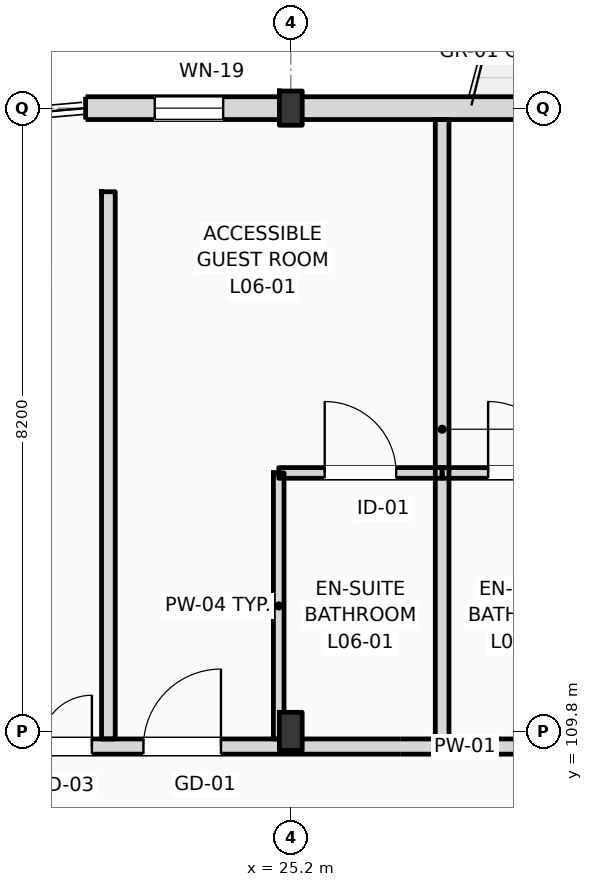
"""IFC4 building model, lengths in metres.
Left out: names, types, materials, properties, quantities, classifications, styles, units other than length and angle.
Written with IfcOpenShell. Run it as: python <this file> out.ifc"""

import sys

from ifc_helpers import new_model, si_unit, direction, frame, frame_2d, origin, origin_2d, place, context, subcontext, project, spatial, rectangle, i_section, extrude, element, fill, save


model = new_model("IFC4")
c1 = context("Model", 3, precision=1e-05, world=origin(), true_north=direction((0.0, 1.0)))
c2 = subcontext(c1, "Body", "Model", "MODEL_VIEW")
j1 = project(units=[si_unit("LENGTHUNIT", "METRE"), si_unit("PLANEANGLEUNIT", "RADIAN")], contexts=[c1])
p1 = place(None, origin())
s1 = spatial("IfcSite", under=j1, at=p1, CompositionType="ELEMENT")
p2 = place(p1, origin())
s2 = spatial("IfcBuilding", under=s1, at=p2, CompositionType="ELEMENT")
p3 = place(p2, frame((0.0, 0.0, 28.2)))
s3 = spatial("IfcBuildingStorey", under=s2, at=p3, CompositionType="ELEMENT", Elevation=28.2)
p4 = place(p3, frame((25.2, 109.8, 0.0), z_axis=(0.0, 0.0, 1.0), x_axis=(1.0, 0.0, 0.0)))
e1 = element("IfcColumn", 1, at=p4, inside=s3, PredefinedType="COLUMN", context=c2, shape_type="SweptSolid", body=[
    extrude(i_section(OverallWidth=0.3, OverallDepth=0.5, WebThickness=0.014, FlangeThickness=0.028, FilletRadius=0.027, at=origin_2d()), origin(), (0.0, 0.0, 1.0), 3.6),
])
p5 = place(p3, frame((25.2, 118.0, 0.0), z_axis=(0.0, 0.0, 1.0), x_axis=(1.0, 0.0, 0.0)))
e2 = element("IfcColumn", 2, at=p5, inside=s3, PredefinedType="COLUMN", context=c2, shape_type="SweptSolid", body=[
    extrude(i_section(OverallWidth=0.3, OverallDepth=0.45, WebThickness=0.014, FlangeThickness=0.026, FilletRadius=0.027, at=origin_2d()), origin(), (0.0, 0.0, 1.0), 3.6),
])
p6 = place(p3, frame((22.5, 118.0, 0.0), z_axis=(0.0, 0.0, 1.0), x_axis=(1.0, 0.0, 0.0)))
e3 = element("IfcWall", 3, at=p6, inside=s3, PredefinedType="STANDARD", context=c2, shape_type="SweptSolid", body=[
    extrude(rectangle(XDim=97.5, YDim=0.3, at=frame_2d((48.75, 0.0))), origin(), (0.0, 0.0, 1.0), 2.8),
])
p7 = place(p6, frame((0.91, 0.0, 0.9)))
e4 = element("IfcOpeningElement", 4, at=p7, cuts=e3, PredefinedType="OPENING", context=c2, shape_type="SweptSolid", body=[
    extrude(rectangle(XDim=0.9, YDim=1.72, at=frame_2d((0.45, 0.86))), frame((0.0, 0.16, 0.0), z_axis=(0.0, -1.0, 0.0), x_axis=(1.0, 0.0, 0.0)), (0.0, 0.0, 1.0), 0.32),
])
p8 = place(p6, frame((6.561, 0.0, 0.0)))
e5 = element("IfcOpeningElement", 5, at=p8, cuts=e3, PredefinedType="OPENING", context=c2, shape_type="SweptSolid", body=[
    extrude(rectangle(XDim=1.2, YDim=2.25, at=frame_2d((0.6, 1.125))), frame((0.0, 0.16, 0.0), z_axis=(0.0, -1.0, 0.0), x_axis=(1.0, 0.0, 0.0)), (0.0, 0.0, 1.0), 0.32),
])
p9 = place(p6, frame((11.477, 0.0, 0.9)))
e6 = element("IfcOpeningElement", 6, at=p9, cuts=e3, PredefinedType="OPENING", context=c2, shape_type="SweptSolid", body=[
    extrude(rectangle(XDim=1.1, YDim=1.5, at=frame_2d((0.55, 0.75))), frame((0.0, 0.16, 0.0), z_axis=(0.0, -1.0, 0.0), x_axis=(1.0, 0.0, 0.0)), (0.0, 0.0, 1.0), 0.32),
])
p10 = place(p6, frame((15.194, 0.0, 0.9)))
e7 = element("IfcOpeningElement", 7, at=p10, cuts=e3, PredefinedType="OPENING", context=c2, shape_type="SweptSolid", body=[
    extrude(rectangle(XDim=1.25, YDim=1.6, at=frame_2d((0.625, 0.8))), frame((0.0, 0.16, 0.0), z_axis=(0.0, -1.0, 0.0), x_axis=(1.0, 0.0, 0.0)), (0.0, 0.0, 1.0), 0.32),
])
p11 = place(p6, frame((19.509, 0.0, 0.9)))
e8 = element("IfcOpeningElement", 8, at=p11, cuts=e3, PredefinedType="OPENING", context=c2, shape_type="SweptSolid", body=[
    extrude(rectangle(XDim=1.4, YDim=1.7, at=frame_2d((0.7, 0.85))), frame((0.0, 0.16, 0.0), z_axis=(0.0, -1.0, 0.0), x_axis=(1.0, 0.0, 0.0)), (0.0, 0.0, 1.0), 0.32),
])
p12 = place(p6, frame((23.258, 0.0, 0.0)))
e9 = element("IfcOpeningElement", 9, at=p12, cuts=e3, PredefinedType="OPENING", context=c2, shape_type="SweptSolid", body=[
    extrude(rectangle(XDim=1.2, YDim=2.25, at=frame_2d((0.6, 1.125))), frame((0.0, 0.16, 0.0), z_axis=(0.0, -1.0, 0.0), x_axis=(1.0, 0.0, 0.0)), (0.0, 0.0, 1.0), 0.32),
])
p13 = place(p6, frame((28.115, 0.0, 0.9)))
e10 = element("IfcOpeningElement", 10, at=p13, cuts=e3, PredefinedType="OPENING", context=c2, shape_type="SweptSolid", body=[
    extrude(rectangle(XDim=1.75, YDim=1.72, at=frame_2d((0.875, 0.86))), frame((0.0, 0.16, 0.0), z_axis=(0.0, -1.0, 0.0), x_axis=(1.0, 0.0, 0.0)), (0.0, 0.0, 1.0), 0.32),
])
p14 = place(p6, frame((31.582, 0.0, 0.9)))
e11 = element("IfcOpeningElement", 11, at=p14, cuts=e3, PredefinedType="OPENING", context=c2, shape_type="SweptSolid", body=[
    extrude(rectangle(XDim=1.35, YDim=1.72, at=frame_2d((0.675, 0.86))), frame((0.0, 0.16, 0.0), z_axis=(0.0, -1.0, 0.0), x_axis=(1.0, 0.0, 0.0)), (0.0, 0.0, 1.0), 0.32),
])
p15 = place(p6, frame((37.379, 0.0, 0.0)))
e12 = element("IfcOpeningElement", 12, at=p15, cuts=e3, PredefinedType="OPENING", context=c2, shape_type="SweptSolid", body=[
    extrude(rectangle(XDim=1.2, YDim=2.25, at=frame_2d((0.6, 1.125))), frame((0.0, 0.16, 0.0), z_axis=(0.0, -1.0, 0.0), x_axis=(1.0, 0.0, 0.0)), (0.0, 0.0, 1.0), 0.32),
])
p16 = place(p6, frame((42.663, 0.0, 0.9)))
e13 = element("IfcOpeningElement", 13, at=p16, cuts=e3, PredefinedType="OPENING", context=c2, shape_type="SweptSolid", body=[
    extrude(rectangle(XDim=1.35, YDim=1.72, at=frame_2d((0.675, 0.86))), frame((0.0, 0.16, 0.0), z_axis=(0.0, -1.0, 0.0), x_axis=(1.0, 0.0, 0.0)), (0.0, 0.0, 1.0), 0.32),
])
p17 = place(p6, frame((45.119, 0.0, 0.9)))
e14 = element("IfcOpeningElement", 14, at=p17, cuts=e3, PredefinedType="OPENING", context=c2, shape_type="SweptSolid", body=[
    extrude(rectangle(XDim=2.871, YDim=1.72, at=frame_2d((1.436, 0.86))), frame((0.0, 0.16, 0.0), z_axis=(0.0, -1.0, 0.0), x_axis=(1.0, 0.0, 0.0)), (0.0, 0.0, 1.0), 0.32),
])
p18 = place(p6, frame((50.41, 0.0, 0.9)))
e15 = element("IfcOpeningElement", 15, at=p18, cuts=e3, PredefinedType="OPENING", context=c2, shape_type="SweptSolid", body=[
    extrude(rectangle(XDim=1.8, YDim=1.72, at=frame_2d((0.9, 0.86))), frame((0.0, 0.16, 0.0), z_axis=(0.0, -1.0, 0.0), x_axis=(1.0, 0.0, 0.0)), (0.0, 0.0, 1.0), 0.32),
])
p19 = place(p6, frame((54.375, 0.0, 0.0)))
e16 = element("IfcOpeningElement", 16, at=p19, cuts=e3, PredefinedType="OPENING", context=c2, shape_type="SweptSolid", body=[
    extrude(rectangle(XDim=1.2, YDim=2.25, at=frame_2d((0.6, 1.125))), frame((0.0, 0.16, 0.0), z_axis=(0.0, -1.0, 0.0), x_axis=(1.0, 0.0, 0.0)), (0.0, 0.0, 1.0), 0.32),
])
p20 = place(p6, frame((59.052, 0.0, 0.9)))
e17 = element("IfcOpeningElement", 17, at=p20, cuts=e3, PredefinedType="OPENING", context=c2, shape_type="SweptSolid", body=[
    extrude(rectangle(XDim=1.35, YDim=1.72, at=frame_2d((0.675, 0.86))), frame((0.0, 0.16, 0.0), z_axis=(0.0, -1.0, 0.0), x_axis=(1.0, 0.0, 0.0)), (0.0, 0.0, 1.0), 0.32),
])
p21 = place(p6, frame((62.768, 0.0, 0.9)))
e18 = element("IfcOpeningElement", 18, at=p21, cuts=e3, PredefinedType="OPENING", context=c2, shape_type="SweptSolid", body=[
    extrude(rectangle(XDim=1.5, YDim=1.72, at=frame_2d((0.75, 0.86))), frame((0.0, 0.16, 0.0), z_axis=(0.0, -1.0, 0.0), x_axis=(1.0, 0.0, 0.0)), (0.0, 0.0, 1.0), 0.32),
])
p22 = place(p6, frame((68.498, 0.0, 0.0)))
e19 = element("IfcOpeningElement", 19, at=p22, cuts=e3, PredefinedType="OPENING", context=c2, shape_type="SweptSolid", body=[
    extrude(rectangle(XDim=1.2, YDim=2.25, at=frame_2d((0.6, 1.125))), frame((0.0, 0.16, 0.0), z_axis=(0.0, -1.0, 0.0), x_axis=(1.0, 0.0, 0.0)), (0.0, 0.0, 1.0), 0.32),
])
p23 = place(p6, frame((71.265, 0.0, 0.9)))
e20 = element("IfcOpeningElement", 20, at=p23, cuts=e3, PredefinedType="OPENING", context=c2, shape_type="SweptSolid", body=[
    extrude(rectangle(XDim=0.9, YDim=1.72, at=frame_2d((0.45, 0.86))), frame((0.0, 0.16, 0.0), z_axis=(0.0, -1.0, 0.0), x_axis=(1.0, 0.0, 0.0)), (0.0, 0.0, 1.0), 0.32),
])
p24 = place(p6, frame((76.316, 0.0, 0.9)))
e21 = element("IfcOpeningElement", 21, at=p24, cuts=e3, PredefinedType="OPENING", context=c2, shape_type="SweptSolid", body=[
    extrude(rectangle(XDim=1.95, YDim=1.72, at=frame_2d((0.975, 0.86))), frame((0.0, 0.16, 0.0), z_axis=(0.0, -1.0, 0.0), x_axis=(1.0, 0.0, 0.0)), (0.0, 0.0, 1.0), 0.32),
])
p25 = place(p6, frame((81.632, 0.0, 0.9)))
e22 = element("IfcOpeningElement", 22, at=p25, cuts=e3, PredefinedType="OPENING", context=c2, shape_type="SweptSolid", body=[
    extrude(rectangle(XDim=1.35, YDim=1.72, at=frame_2d((0.675, 0.86))), frame((0.0, 0.16, 0.0), z_axis=(0.0, -1.0, 0.0), x_axis=(1.0, 0.0, 0.0)), (0.0, 0.0, 1.0), 0.32),
])
p26 = place(p6, frame((84.948, 0.0, 0.9)))
e23 = element("IfcOpeningElement", 23, at=p26, cuts=e3, PredefinedType="OPENING", context=c2, shape_type="SweptSolid", body=[
    extrude(rectangle(XDim=2.25, YDim=1.72, at=frame_2d((1.125, 0.86))), frame((0.0, 0.16, 0.0), z_axis=(0.0, -1.0, 0.0), x_axis=(1.0, 0.0, 0.0)), (0.0, 0.0, 1.0), 0.32),
])
p27 = place(p6, frame((90.063, 0.0, 0.9)))
e24 = element("IfcOpeningElement", 24, at=p27, cuts=e3, PredefinedType="OPENING", context=c2, shape_type="SweptSolid", body=[
    extrude(rectangle(XDim=1.8, YDim=1.72, at=frame_2d((0.9, 0.86))), frame((0.0, 0.16, 0.0), z_axis=(0.0, -1.0, 0.0), x_axis=(1.0, 0.0, 0.0)), (0.0, 0.0, 1.0), 0.32),
])
p28 = place(p6, frame((93.529, 0.0, 0.9)))
e25 = element("IfcOpeningElement", 25, at=p28, cuts=e3, PredefinedType="OPENING", context=c2, shape_type="SweptSolid", body=[
    extrude(rectangle(XDim=2.55, YDim=1.72, at=frame_2d((1.275, 0.86))), frame((0.0, 0.16, 0.0), z_axis=(0.0, -1.0, 0.0), x_axis=(1.0, 0.0, 0.0)), (0.0, 0.0, 1.0), 0.32),
])
p29 = place(p3, frame((10.65, 109.6, 0.0), z_axis=(0.0, 0.0, 1.0), x_axis=(1.0, 0.0, 0.0)))
e26 = element("IfcWall", 26, at=p29, inside=s3, PredefinedType="PARTITIONING", context=c2, shape_type="SweptSolid", body=[
    extrude(rectangle(XDim=109.21, YDim=0.2, at=frame_2d((54.605, 0.0))), origin(), (0.0, 0.0, 1.0), 2.8),
])
p30 = place(p29, frame((12.611, 0.0, 0.0)))
e27 = element("IfcOpeningElement", 27, at=p30, cuts=e26, PredefinedType="OPENING", context=c2, shape_type="SweptSolid", body=[
    extrude(rectangle(XDim=1.02, YDim=2.2, at=frame_2d((0.51, 1.1))), frame((0.0, 0.11, 0.0), z_axis=(0.0, -1.0, 0.0), x_axis=(1.0, 0.0, 0.0)), (0.0, 0.0, 1.0), 0.22),
])
p31 = place(p29, frame((19.451, 0.0, 0.0)))
e28 = element("IfcOpeningElement", 28, at=p31, cuts=e26, PredefinedType="OPENING", context=c2, shape_type="SweptSolid", body=[
    extrude(rectangle(XDim=1.02, YDim=2.2, at=frame_2d((0.51, 1.1))), frame((0.0, 0.11, 0.0), z_axis=(0.0, -1.0, 0.0), x_axis=(1.0, 0.0, 0.0)), (0.0, 0.0, 1.0), 0.22),
])
p32 = place(p29, frame((23.842, 0.0, 0.0)))
e29 = element("IfcOpeningElement", 29, at=p32, cuts=e26, PredefinedType="OPENING", context=c2, shape_type="SweptSolid", body=[
    extrude(rectangle(XDim=1.02, YDim=2.2, at=frame_2d((0.51, 1.1))), frame((0.0, 0.11, 0.0), z_axis=(0.0, -1.0, 0.0), x_axis=(1.0, 0.0, 0.0)), (0.0, 0.0, 1.0), 0.22),
])
p33 = place(p29, frame((26.084, 0.0, 0.0)))
e30 = element("IfcOpeningElement", 30, at=p33, cuts=e26, PredefinedType="OPENING", context=c2, shape_type="SweptSolid", body=[
    extrude(rectangle(XDim=1.02, YDim=2.2, at=frame_2d((0.51, 1.1))), frame((0.0, 0.11, 0.0), z_axis=(0.0, -1.0, 0.0), x_axis=(1.0, 0.0, 0.0)), (0.0, 0.0, 1.0), 0.22),
])
p34 = place(p29, frame((32.655, 0.0, 0.0)))
e31 = element("IfcOpeningElement", 31, at=p34, cuts=e26, PredefinedType="OPENING", context=c2, shape_type="SweptSolid", body=[
    extrude(rectangle(XDim=0.96, YDim=2.2, at=frame_2d((0.48, 1.1))), frame((0.0, 0.11, 0.0), z_axis=(0.0, -1.0, 0.0), x_axis=(1.0, 0.0, 0.0)), (0.0, 0.0, 1.0), 0.22),
])
p35 = place(p29, frame((34.895, 0.0, 0.0)))
e32 = element("IfcOpeningElement", 32, at=p35, cuts=e26, PredefinedType="OPENING", context=c2, shape_type="SweptSolid", body=[
    extrude(rectangle(XDim=0.96, YDim=2.2, at=frame_2d((0.48, 1.1))), frame((0.0, 0.11, 0.0), z_axis=(0.0, -1.0, 0.0), x_axis=(1.0, 0.0, 0.0)), (0.0, 0.0, 1.0), 0.22),
])
p36 = place(p29, frame((41.436, 0.0, 0.0)))
e33 = element("IfcOpeningElement", 33, at=p36, cuts=e26, PredefinedType="OPENING", context=c2, shape_type="SweptSolid", body=[
    extrude(rectangle(XDim=0.96, YDim=2.2, at=frame_2d((0.48, 1.1))), frame((0.0, 0.11, 0.0), z_axis=(0.0, -1.0, 0.0), x_axis=(1.0, 0.0, 0.0)), (0.0, 0.0, 1.0), 0.22),
])
p37 = place(p29, frame((43.427, 0.0, 0.0)))
e34 = element("IfcOpeningElement", 34, at=p37, cuts=e26, PredefinedType="OPENING", context=c2, shape_type="SweptSolid", body=[
    extrude(rectangle(XDim=0.96, YDim=2.2, at=frame_2d((0.48, 1.1))), frame((0.0, 0.11, 0.0), z_axis=(0.0, -1.0, 0.0), x_axis=(1.0, 0.0, 0.0)), (0.0, 0.0, 1.0), 0.22),
])
p38 = place(p29, frame((50.218, 0.0, 0.0)))
e35 = element("IfcOpeningElement", 35, at=p38, cuts=e26, PredefinedType="OPENING", context=c2, shape_type="SweptSolid", body=[
    extrude(rectangle(XDim=0.96, YDim=2.2, at=frame_2d((0.48, 1.1))), frame((0.0, 0.11, 0.0), z_axis=(0.0, -1.0, 0.0), x_axis=(1.0, 0.0, 0.0)), (0.0, 0.0, 1.0), 0.22),
])
p39 = place(p29, frame((54.859, 0.0, 0.0)))
e36 = element("IfcOpeningElement", 36, at=p39, cuts=e26, PredefinedType="OPENING", context=c2, shape_type="SweptSolid", body=[
    extrude(rectangle(XDim=0.96, YDim=2.2, at=frame_2d((0.48, 1.1))), frame((0.0, 0.11, 0.0), z_axis=(0.0, -1.0, 0.0), x_axis=(1.0, 0.0, 0.0)), (0.0, 0.0, 1.0), 0.22),
])
p40 = place(p29, frame((59.0, 0.0, 0.0)))
e37 = element("IfcOpeningElement", 37, at=p40, cuts=e26, PredefinedType="OPENING", context=c2, shape_type="SweptSolid", body=[
    extrude(rectangle(XDim=0.96, YDim=2.2, at=frame_2d((0.48, 1.1))), frame((0.0, 0.11, 0.0), z_axis=(0.0, -1.0, 0.0), x_axis=(1.0, 0.0, 0.0)), (0.0, 0.0, 1.0), 0.22),
])
p41 = place(p29, frame((63.39, 0.0, 0.0)))
e38 = element("IfcOpeningElement", 38, at=p41, cuts=e26, PredefinedType="OPENING", context=c2, shape_type="SweptSolid", body=[
    extrude(rectangle(XDim=0.96, YDim=2.2, at=frame_2d((0.48, 1.1))), frame((0.0, 0.11, 0.0), z_axis=(0.0, -1.0, 0.0), x_axis=(1.0, 0.0, 0.0)), (0.0, 0.0, 1.0), 0.22),
])
p42 = place(p29, frame((65.631, 0.0, 0.0)))
e39 = element("IfcOpeningElement", 39, at=p42, cuts=e26, PredefinedType="OPENING", context=c2, shape_type="SweptSolid", body=[
    extrude(rectangle(XDim=0.96, YDim=2.2, at=frame_2d((0.48, 1.1))), frame((0.0, 0.11, 0.0), z_axis=(0.0, -1.0, 0.0), x_axis=(1.0, 0.0, 0.0)), (0.0, 0.0, 1.0), 0.22),
])
p43 = place(p29, frame((72.172, 0.0, 0.0)))
e40 = element("IfcOpeningElement", 40, at=p43, cuts=e26, PredefinedType="OPENING", context=c2, shape_type="SweptSolid", body=[
    extrude(rectangle(XDim=0.96, YDim=2.2, at=frame_2d((0.48, 1.1))), frame((0.0, 0.11, 0.0), z_axis=(0.0, -1.0, 0.0), x_axis=(1.0, 0.0, 0.0)), (0.0, 0.0, 1.0), 0.22),
])
p44 = place(p29, frame((74.413, 0.0, 0.0)))
e41 = element("IfcOpeningElement", 41, at=p44, cuts=e26, PredefinedType="OPENING", context=c2, shape_type="SweptSolid", body=[
    extrude(rectangle(XDim=0.96, YDim=2.2, at=frame_2d((0.48, 1.1))), frame((0.0, 0.11, 0.0), z_axis=(0.0, -1.0, 0.0), x_axis=(1.0, 0.0, 0.0)), (0.0, 0.0, 1.0), 0.22),
])
p45 = place(p29, frame((80.954, 0.0, 0.0)))
e42 = element("IfcOpeningElement", 42, at=p45, cuts=e26, PredefinedType="OPENING", context=c2, shape_type="SweptSolid", body=[
    extrude(rectangle(XDim=0.96, YDim=2.2, at=frame_2d((0.48, 1.1))), frame((0.0, 0.11, 0.0), z_axis=(0.0, -1.0, 0.0), x_axis=(1.0, 0.0, 0.0)), (0.0, 0.0, 1.0), 0.22),
])
p46 = place(p29, frame((83.195, 0.0, 0.0)))
e43 = element("IfcOpeningElement", 43, at=p46, cuts=e26, PredefinedType="OPENING", context=c2, shape_type="SweptSolid", body=[
    extrude(rectangle(XDim=0.96, YDim=2.2, at=frame_2d((0.48, 1.1))), frame((0.0, 0.11, 0.0), z_axis=(0.0, -1.0, 0.0), x_axis=(1.0, 0.0, 0.0)), (0.0, 0.0, 1.0), 0.22),
])
p47 = place(p29, frame((89.735, 0.0, 0.0)))
e44 = element("IfcOpeningElement", 44, at=p47, cuts=e26, PredefinedType="OPENING", context=c2, shape_type="SweptSolid", body=[
    extrude(rectangle(XDim=0.96, YDim=2.2, at=frame_2d((0.48, 1.1))), frame((0.0, 0.11, 0.0), z_axis=(0.0, -1.0, 0.0), x_axis=(1.0, 0.0, 0.0)), (0.0, 0.0, 1.0), 0.22),
])
p48 = place(p29, frame((94.126, 0.0, 0.0)))
e45 = element("IfcOpeningElement", 45, at=p48, cuts=e26, PredefinedType="OPENING", context=c2, shape_type="SweptSolid", body=[
    extrude(rectangle(XDim=0.96, YDim=2.2, at=frame_2d((0.48, 1.1))), frame((0.0, 0.11, 0.0), z_axis=(0.0, -1.0, 0.0), x_axis=(1.0, 0.0, 0.0)), (0.0, 0.0, 1.0), 0.22),
])
p49 = place(p29, frame((98.517, 0.0, 0.0)))
e46 = element("IfcOpeningElement", 46, at=p49, cuts=e26, PredefinedType="OPENING", context=c2, shape_type="SweptSolid", body=[
    extrude(rectangle(XDim=0.96, YDim=2.2, at=frame_2d((0.48, 1.1))), frame((0.0, 0.11, 0.0), z_axis=(0.0, -1.0, 0.0), x_axis=(1.0, 0.0, 0.0)), (0.0, 0.0, 1.0), 0.22),
])
p50 = place(p29, frame((102.908, 0.0, 0.0)))
e47 = element("IfcOpeningElement", 47, at=p50, cuts=e26, PredefinedType="OPENING", context=c2, shape_type="SweptSolid", body=[
    extrude(rectangle(XDim=0.96, YDim=2.2, at=frame_2d((0.48, 1.1))), frame((0.0, 0.11, 0.0), z_axis=(0.0, -1.0, 0.0), x_axis=(1.0, 0.0, 0.0)), (0.0, 0.0, 1.0), 0.22),
])
p51 = place(p29, frame((105.099, 0.0, 0.0)))
e48 = element("IfcOpeningElement", 48, at=p51, cuts=e26, PredefinedType="OPENING", context=c2, shape_type="SweptSolid", body=[
    extrude(rectangle(XDim=0.96, YDim=2.2, at=frame_2d((0.48, 1.1))), frame((0.0, 0.11, 0.0), z_axis=(0.0, -1.0, 0.0), x_axis=(1.0, 0.0, 0.0)), (0.0, 0.0, 1.0), 0.22),
])
p52 = place(p29, frame((2.716, 0.0, 0.0)))
e49 = element("IfcOpeningElement", 49, at=p52, cuts=e26, PredefinedType="OPENING", context=c2, shape_type="SweptSolid", body=[
    extrude(rectangle(XDim=1.35, YDim=2.25, at=frame_2d((0.675, 1.125))), frame((0.0, 0.11, 0.0), z_axis=(0.0, -1.0, 0.0), x_axis=(1.0, 0.0, 0.0)), (0.0, 0.0, 1.0), 0.22),
])
p53 = place(p29, frame((6.65, 0.0, 0.0)))
e50 = element("IfcOpeningElement", 50, at=p53, cuts=e26, PredefinedType="OPENING", context=c2, shape_type="SweptSolid", body=[
    extrude(rectangle(XDim=1.35, YDim=2.25, at=frame_2d((0.675, 1.125))), frame((0.0, 0.11, 0.0), z_axis=(0.0, -1.0, 0.0), x_axis=(1.0, 0.0, 0.0)), (0.0, 0.0, 1.0), 0.22),
])
p54 = place(p29, frame((10.583, 0.0, 0.0)))
e51 = element("IfcOpeningElement", 51, at=p54, cuts=e26, PredefinedType="OPENING", context=c2, shape_type="SweptSolid", body=[
    extrude(rectangle(XDim=1.35, YDim=2.25, at=frame_2d((0.675, 1.125))), frame((0.0, 0.11, 0.0), z_axis=(0.0, -1.0, 0.0), x_axis=(1.0, 0.0, 0.0)), (0.0, 0.0, 1.0), 0.22),
])
p55 = place(p3, frame((27.191, 109.7, 0.0), z_axis=(0.0, 0.0, 1.0), x_axis=(0.0, 1.0, 0.0)))
e52 = element("IfcWall", 52, at=p55, inside=s3, PredefinedType="PARTITIONING", context=c2, shape_type="SweptSolid", body=[
    extrude(rectangle(XDim=8.15, YDim=0.18, at=frame_2d((4.075, 0.0))), origin(), (0.0, 0.0, 1.0), 3.36),
])
p56 = place(p3, frame((25.041, 109.7, 0.0), z_axis=(0.0, 0.0, 1.0), x_axis=(0.0, 1.0, 0.0)))
e53 = element("IfcWall", 53, at=p56, inside=s3, PredefinedType="PARTITIONING", context=c2, shape_type="SweptSolid", body=[
    extrude(rectangle(XDim=3.5, YDim=0.14, at=frame_2d((1.75, 0.0))), origin(), (0.0, 0.0, 1.0), 2.99),
])
p57 = place(p3, frame((25.041, 113.2, 0.0), z_axis=(0.0, 0.0, 1.0), x_axis=(1.0, 0.0, 0.0)))
e54 = element("IfcWall", 54, at=p57, inside=s3, PredefinedType="PARTITIONING", context=c2, shape_type="SweptSolid", body=[
    extrude(rectangle(XDim=2.15, YDim=0.14, at=frame_2d((1.075, 0.0))), origin(), (0.0, 0.0, 1.0), 3.36),
])
p58 = place(p57, frame((0.605, 0.0, 0.0)))
e55 = element("IfcOpeningElement", 55, at=p58, cuts=e54, PredefinedType="OPENING", context=c2, shape_type="SweptSolid", body=[
    extrude(rectangle(XDim=0.94, YDim=2.15, at=frame_2d((0.47, 1.075))), frame((0.0, 0.08, 0.0), z_axis=(0.0, -1.0, 0.0), x_axis=(1.0, 0.0, 0.0)), (0.0, 0.0, 1.0), 0.16),
])
p59 = place(p3, frame((27.191, 113.2, 0.0), z_axis=(0.0, 0.0, 1.0), x_axis=(1.0, 0.0, 0.0)))
e56 = element("IfcWall", 56, at=p59, inside=s3, PredefinedType="PARTITIONING", context=c2, shape_type="SweptSolid", body=[
    extrude(rectangle(XDim=2.15, YDim=0.14, at=frame_2d((1.075, 0.0))), origin(), (0.0, 0.0, 1.0), 3.36),
])
p60 = place(p59, frame((0.605, 0.0, 0.0)))
e57 = element("IfcOpeningElement", 57, at=p60, cuts=e56, PredefinedType="OPENING", context=c2, shape_type="SweptSolid", body=[
    extrude(rectangle(XDim=0.94, YDim=2.15, at=frame_2d((0.47, 1.075))), frame((0.0, 0.08, 0.0), z_axis=(0.0, -1.0, 0.0), x_axis=(1.0, 0.0, 0.0)), (0.0, 0.0, 1.0), 0.16),
])
p61 = place(p3, frame((22.8, 109.7, 0.0), z_axis=(0.0, 0.0, 1.0), x_axis=(0.0, 1.0, 0.0)))
e58 = element("IfcWall", 58, at=p61, inside=s3, PredefinedType="PARTITIONING", context=c2, shape_type="SweptSolid", body=[
    extrude(rectangle(XDim=7.2, YDim=0.18, at=frame_2d((3.6, 0.0))), origin(), (0.0, 0.0, 1.0), 3.36),
])
p62 = place(p7, origin())
e59 = element("IfcWindow", 59, at=p62, inside=s3, PartitioningType="DOUBLE_PANEL_VERTICAL", PredefinedType="WINDOW", context=c2, shape_type="SweptSolid", body=[
    extrude(rectangle(XDim=0.9, YDim=1.72, at=frame_2d((0.45, 0.86))), frame((0.0, 0.03, 0.0), z_axis=(0.0, -1.0, 0.0), x_axis=(1.0, 0.0, 0.0)), (0.0, 0.0, 1.0), 0.06),
])
fill(e4, e59)
p63 = place(p30, origin())
e60 = element("IfcDoor", 60, at=p63, inside=s3, OperationType="SINGLE_SWING_RIGHT", PredefinedType="DOOR", context=c2, shape_type="SweptSolid", body=[
    extrude(rectangle(XDim=1.02, YDim=2.2, at=frame_2d((0.51, 1.1))), frame((0.0, 0.025, 0.0), z_axis=(0.0, -1.0, 0.0), x_axis=(1.0, 0.0, 0.0)), (0.0, 0.0, 1.0), 0.05),
])
fill(e27, e60)
p64 = place(p58, origin())
e61 = element("IfcDoor", 61, at=p64, inside=s3, OperationType="SINGLE_SWING_LEFT", PredefinedType="DOOR", context=c2, shape_type="SweptSolid", body=[
    extrude(rectangle(XDim=0.94, YDim=2.15, at=frame_2d((0.47, 1.075))), frame((0.0, 0.025, 0.0), z_axis=(0.0, -1.0, 0.0), x_axis=(1.0, 0.0, 0.0)), (0.0, 0.0, 1.0), 0.05),
])
fill(e55, e61)
p65 = place(p60, origin())
e62 = element("IfcDoor", 62, at=p65, inside=s3, OperationType="SINGLE_SWING_LEFT", PredefinedType="DOOR", context=c2, shape_type="SweptSolid", body=[
    extrude(rectangle(XDim=0.94, YDim=2.15, at=frame_2d((0.47, 1.075))), frame((0.0, 0.025, 0.0), z_axis=(0.0, -1.0, 0.0), x_axis=(1.0, 0.0, 0.0)), (0.0, 0.0, 1.0), 0.05),
])
fill(e57, e62)
p66 = place(p54, origin())
e63 = element("IfcDoor", 63, at=p66, inside=s3, OperationType="DOUBLE_SWING_LEFT", PredefinedType="DOOR", context=c2, shape_type="SweptSolid", body=[
    extrude(rectangle(XDim=1.35, YDim=2.25, at=frame_2d((0.675, 1.125))), frame((0.0, 0.025, 0.0), z_axis=(0.0, -1.0, 0.0), x_axis=(1.0, 0.0, 0.0)), (0.0, 0.0, 1.0), 0.05),
])
fill(e51, e63)
save(model, sys.argv[1])
